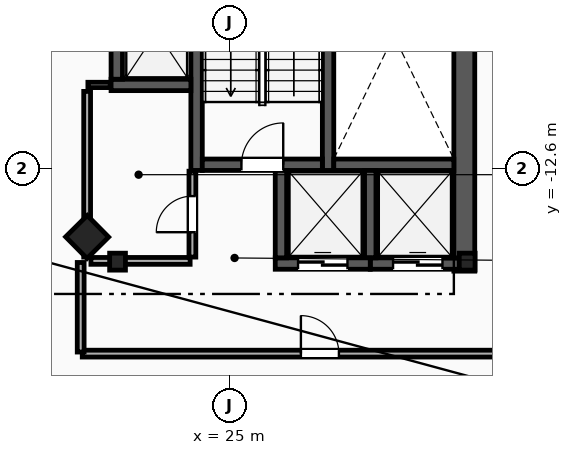
"""IFC4 building model, lengths in metres.
Left out: names, types, materials, properties, quantities, classifications, styles, units other than length and angle.
Written with IfcOpenShell. Run it as: python <this file> out.ifc"""

import sys

from ifc_helpers import new_model, si_unit, direction, frame, frame_2d, origin, origin_2d, place, context, subcontext, project, spatial, rectangle, i_section, extrude, element, fill, save


model = new_model("IFC4")
c1 = context("Model", 3, precision=1e-05, world=origin(), true_north=direction((0.0, 1.0)))
c2 = subcontext(c1, "Body", "Model", "MODEL_VIEW")
j1 = project(units=[si_unit("LENGTHUNIT", "METRE"), si_unit("PLANEANGLEUNIT", "RADIAN")], contexts=[c1])
p1 = place(None, origin())
s1 = spatial("IfcSite", under=j1, at=p1, CompositionType="ELEMENT")
p2 = place(p1, origin())
s2 = spatial("IfcBuilding", under=s1, at=p2, CompositionType="ELEMENT")
p3 = place(p2, frame((0.0, 0.0, 246.8)))
s3 = spatial("IfcBuildingStorey", under=s2, at=p3, CompositionType="ELEMENT", Elevation=246.8)
for number, where, z_axis, x_axis in (
    (1, (22.05, -15.05, 0.0), (0.0, 0.0, 1.0), (1.0, 0.0, 0.0)),
    (2, (31.25, -15.05, 0.0), (0.0, 0.0, 1.0), (1.0, 0.0, 0.0)),
):
    element("IfcColumn", number, at=place(p3, frame(where, z_axis=z_axis, x_axis=x_axis)), inside=s3, PredefinedType="COLUMN", context=c2, shape_type="SweptSolid", body=[
        extrude(i_section(OverallWidth=0.416, OverallDepth=0.446, WebThickness=0.039, FlangeThickness=0.063, FilletRadius=0.018, at=origin_2d()), origin(), (0.0, 0.0, 1.0), 3.6),
    ])
p4 = place(p3, frame((21.25, -14.4, 0.0), z_axis=(0.0, 0.0, 1.0), x_axis=(0.703270634186, -0.710922228581, 0.0)))
e3 = element("IfcColumn", 3, at=p4, inside=s3, PredefinedType="COLUMN", context=c2, shape_type="SweptSolid", body=[
    extrude(rectangle(XDim=0.8, YDim=0.8, at=origin_2d()), origin(), (0.0, 0.0, 1.0), 3.6),
])
p5 = place(p3, frame((31.175, -15.3, 0.0), z_axis=(0.0, 0.0, 1.0), x_axis=(0.0, 1.0, 0.0)))
e4 = element("IfcWall", 4, at=p5, inside=s3, PredefinedType="SHEAR", context=c2, shape_type="SweptSolid", body=[
    extrude(rectangle(XDim=13.33, YDim=0.55, at=frame_2d((6.665, 0.0))), origin(), (0.0, 0.0, 1.0), 3.34),
])
for number, where, z_axis, x_axis in (
    (5, (27.59, -12.65, 0.0), (0.0, 0.0, 1.0), (0.0, 1.0, 0.0)),
    (6, (24.13, -12.65, 0.0), (0.0, 0.0, 1.0), (0.0, 1.0, 0.0)),
):
    element("IfcWall", number, at=place(p3, frame(where, z_axis=z_axis, x_axis=x_axis)), inside=s3, PredefinedType="SHEAR", context=c2, shape_type="SweptSolid", body=[
        extrude(rectangle(XDim=10.68, YDim=0.3, at=frame_2d((5.34, 0.0))), origin(), (0.0, 0.0, 1.0), 3.34),
    ])
p6 = place(p3, frame((27.74, -12.5, 0.0), z_axis=(0.0, 0.0, 1.0), x_axis=(1.0, 0.0, 0.0)))
e7 = element("IfcWall", 7, at=p6, inside=s3, PredefinedType="SHEAR", context=c2, shape_type="SweptSolid", body=[
    extrude(rectangle(XDim=3.16, YDim=0.3, at=frame_2d((1.58, 0.0))), origin(), (0.0, 0.0, 1.0), 3.34),
])
p7 = place(p3, frame((24.28, -12.5, 0.0), z_axis=(0.0, 0.0, 1.0), x_axis=(1.0, 0.0, 0.0)))
e8 = element("IfcWall", 8, at=p7, inside=s3, PredefinedType="SHEAR", context=c2, shape_type="SweptSolid", body=[
    extrude(rectangle(XDim=3.16, YDim=0.3, at=frame_2d((1.58, 0.0))), origin(), (0.0, 0.0, 1.0), 3.34),
])
p8 = place(p7, frame((1.03, 0.0, 0.0)))
e9 = element("IfcOpeningElement", 9, at=p8, cuts=e8, PredefinedType="OPENING", context=c2, shape_type="SweptSolid", body=[
    extrude(rectangle(XDim=1.1, YDim=2.15, at=frame_2d((0.55, 1.075))), frame((0.0, 0.16, 0.0), z_axis=(0.0, -1.0, 0.0), x_axis=(1.0, 0.0, 0.0)), (0.0, 0.0, 1.0), 0.32),
])
p9 = place(p3, frame((21.88, -10.4, 0.0), z_axis=(0.0, 0.0, 1.0), x_axis=(1.0, 0.0, 0.0)))
e10 = element("IfcWall", 10, at=p9, inside=s3, PredefinedType="SHEAR", context=c2, shape_type="SweptSolid", body=[
    extrude(rectangle(XDim=2.1, YDim=0.3, at=frame_2d((1.05, 0.0))), origin(), (0.0, 0.0, 1.0), 3.34),
])
p10 = place(p3, frame((22.03, -10.25, 0.0), z_axis=(0.0, 0.0, 1.0), x_axis=(0.0, 1.0, 0.0)))
e11 = element("IfcWall", 11, at=p10, inside=s3, PredefinedType="SHEAR", context=c2, shape_type="SweptSolid", body=[
    extrude(rectangle(XDim=2.5, YDim=0.3, at=frame_2d((1.25, 0.0))), origin(), (0.0, 0.0, 1.0), 3.34),
])
p11 = place(p3, frame((28.7, -15.1, 0.0), z_axis=(0.0, 0.0, 1.0), x_axis=(1.0, 0.0, 0.0)))
e12 = element("IfcWall", 12, at=p11, inside=s3, PredefinedType="SHEAR", context=c2, shape_type="SweptSolid", body=[
    extrude(rectangle(XDim=2.5, YDim=0.3, at=frame_2d((1.25, 0.0))), origin(), (0.0, 0.0, 1.0), 3.34),
])
p12 = place(p11, frame((0.6, 0.0, 0.0)))
e13 = element("IfcOpeningElement", 13, at=p12, cuts=e12, PredefinedType="OPENING", context=c2, shape_type="SweptSolid", body=[
    extrude(rectangle(XDim=1.3, YDim=2.2, at=frame_2d((0.65, 1.1))), frame((0.0, 0.16, 0.0), z_axis=(0.0, -1.0, 0.0), x_axis=(1.0, 0.0, 0.0)), (0.0, 0.0, 1.0), 0.32),
])
p13 = place(p3, frame((28.7, -14.95, 0.0), z_axis=(0.0, 0.0, 1.0), x_axis=(0.0, 1.0, 0.0)))
e14 = element("IfcWall", 14, at=p13, inside=s3, PredefinedType="SHEAR", context=c2, shape_type="SweptSolid", body=[
    extrude(rectangle(XDim=2.3, YDim=0.3, at=frame_2d((1.15, 0.0))), origin(), (0.0, 0.0, 1.0), 3.34),
])
p14 = place(p3, frame((26.2, -15.1, 0.0), z_axis=(0.0, 0.0, 1.0), x_axis=(1.0, 0.0, 0.0)))
e15 = element("IfcWall", 15, at=p14, inside=s3, PredefinedType="SHEAR", context=c2, shape_type="SweptSolid", body=[
    extrude(rectangle(XDim=2.5, YDim=0.3, at=frame_2d((1.25, 0.0))), origin(), (0.0, 0.0, 1.0), 3.34),
])
p15 = place(p14, frame((0.6, 0.0, 0.0)))
e16 = element("IfcOpeningElement", 16, at=p15, cuts=e15, PredefinedType="OPENING", context=c2, shape_type="SweptSolid", body=[
    extrude(rectangle(XDim=1.3, YDim=2.2, at=frame_2d((0.65, 1.1))), frame((0.0, 0.16, 0.0), z_axis=(0.0, -1.0, 0.0), x_axis=(1.0, 0.0, 0.0)), (0.0, 0.0, 1.0), 0.32),
])
p16 = place(p3, frame((26.35, -14.95, 0.0), z_axis=(0.0, 0.0, 1.0), x_axis=(0.0, 1.0, 0.0)))
e17 = element("IfcWall", 17, at=p16, inside=s3, PredefinedType="SHEAR", context=c2, shape_type="SweptSolid", body=[
    extrude(rectangle(XDim=2.3, YDim=0.3, at=frame_2d((1.15, 0.0))), origin(), (0.0, 0.0, 1.0), 3.34),
])
p17 = place(p3, frame((21.27, -10.4, 0.0), z_axis=(0.0, 0.0, 1.0), x_axis=(1.0, 0.0, 0.0)))
e18 = element("IfcWall", 18, at=p17, inside=s3, PredefinedType="PARTITIONING", context=c2, shape_type="SweptSolid", body=[
    extrude(rectangle(XDim=0.59, YDim=0.14, at=frame_2d((0.295, 0.0))), origin(), (0.0, 0.0, 1.0), 3.34),
])
p18 = place(p3, frame((21.25, -14.93, 0.0), z_axis=(0.0, 0.0, 1.0), x_axis=(0.0, 1.0, 0.0)))
e19 = element("IfcWall", 19, at=p18, inside=s3, PredefinedType="PARTITIONING", context=c2, shape_type="SweptSolid", body=[
    extrude(rectangle(XDim=4.36, YDim=0.18, at=frame_2d((2.18, 0.0))), origin(), (0.0, 0.0, 1.0), 3.34),
])
p19 = place(p3, frame((21.35, -15.03, 0.0), z_axis=(0.0, 0.0, 1.0), x_axis=(1.0, 0.0, 0.0)))
e20 = element("IfcWall", 20, at=p19, inside=s3, PredefinedType="PARTITIONING", context=c2, shape_type="SweptSolid", body=[
    extrude(rectangle(XDim=2.61, YDim=0.18, at=frame_2d((1.305, 0.0))), origin(), (0.0, 0.0, 1.0), 2.413),
])
p20 = place(p3, frame((24.02, -14.93, 0.0), z_axis=(0.0, 0.0, 1.0), x_axis=(0.0, 1.0, 0.0)))
e21 = element("IfcWall", 21, at=p20, inside=s3, PredefinedType="PARTITIONING", context=c2, shape_type="SweptSolid", body=[
    extrude(rectangle(XDim=2.26, YDim=0.18, at=frame_2d((1.13, 0.0))), origin(), (0.0, 0.0, 1.0), 3.34),
])
p21 = place(p20, frame((0.655, 0.0, 0.0)))
e22 = element("IfcOpeningElement", 22, at=p21, cuts=e21, PredefinedType="OPENING", context=c2, shape_type="SweptSolid", body=[
    extrude(rectangle(XDim=0.95, YDim=2.1, at=frame_2d((0.475, 1.05))), frame((0.0, 0.1, 0.0), z_axis=(0.0, -1.0, 0.0), x_axis=(1.0, 0.0, 0.0)), (0.0, 0.0, 1.0), 0.2),
])
p22 = place(p3, frame((21.122, -17.47, 0.0), z_axis=(0.0, 0.0, 1.0), x_axis=(1.0, 0.0, 0.0)))
e23 = element("IfcWall", 23, at=p22, inside=s3, PredefinedType="PARTITIONING", context=c2, shape_type="SweptSolid", body=[
    extrude(rectangle(XDim=12.507, YDim=0.18, at=frame_2d((6.253, 0.0))), origin(), (0.0, 0.0, 1.0), 3.34),
])
p23 = place(p22, frame((5.753, 0.0, 0.0)))
e24 = element("IfcOpeningElement", 24, at=p23, cuts=e23, PredefinedType="OPENING", context=c2, shape_type="SweptSolid", body=[
    extrude(rectangle(XDim=1.0, YDim=2.15, at=frame_2d((0.5, 1.075))), frame((0.0, 0.1, 0.0), z_axis=(0.0, -1.0, 0.0), x_axis=(1.0, 0.0, 0.0)), (0.0, 0.0, 1.0), 0.2),
])
p24 = place(p3, frame((21.08, -15.072, 0.0), z_axis=(0.0, 0.0, 1.0), x_axis=(0.0, -1.0, 0.0)))
e25 = element("IfcWall", 25, at=p24, inside=s3, PredefinedType="PARTITIONING", context=c2, shape_type="SweptSolid", body=[
    extrude(rectangle(XDim=2.357, YDim=0.18, at=frame_2d((1.178, 0.0))), origin(), (0.0, 0.0, 1.0), 3.34),
])
p25 = place(p8, origin())
e26 = element("IfcDoor", 26, at=p25, inside=s3, OperationType="SINGLE_SWING_RIGHT", PredefinedType="DOOR", context=c2, shape_type="SweptSolid", body=[
    extrude(rectangle(XDim=1.1, YDim=2.15, at=frame_2d((0.55, 1.075))), frame((0.0, 0.025, 0.0), z_axis=(0.0, -1.0, 0.0), x_axis=(1.0, 0.0, 0.0)), (0.0, 0.0, 1.0), 0.05),
])
fill(e9, e26)
p26 = place(p12, origin())
e27 = element("IfcDoor", 27, at=p26, inside=s3, OperationType="SLIDING_TO_LEFT", PredefinedType="TRAPDOOR", context=c2, shape_type="SweptSolid", body=[
    extrude(rectangle(XDim=1.3, YDim=2.2, at=frame_2d((0.65, 1.1))), frame((0.0, 0.025, 0.0), z_axis=(0.0, -1.0, 0.0), x_axis=(1.0, 0.0, 0.0)), (0.0, 0.0, 1.0), 0.05),
])
fill(e13, e27)
p27 = place(p15, origin())
e28 = element("IfcDoor", 28, at=p27, inside=s3, OperationType="SLIDING_TO_LEFT", PredefinedType="TRAPDOOR", context=c2, shape_type="SweptSolid", body=[
    extrude(rectangle(XDim=1.3, YDim=2.2, at=frame_2d((0.65, 1.1))), frame((0.0, 0.025, 0.0), z_axis=(0.0, -1.0, 0.0), x_axis=(1.0, 0.0, 0.0)), (0.0, 0.0, 1.0), 0.05),
])
fill(e16, e28)
p28 = place(p23, origin())
e29 = element("IfcDoor", 29, at=p28, inside=s3, OperationType="SINGLE_SWING_LEFT", PredefinedType="DOOR", context=c2, shape_type="SweptSolid", body=[
    extrude(rectangle(XDim=1.0, YDim=2.15, at=frame_2d((0.5, 1.075))), frame((0.0, 0.025, 0.0), z_axis=(0.0, -1.0, 0.0), x_axis=(1.0, 0.0, 0.0)), (0.0, 0.0, 1.0), 0.05),
])
fill(e24, e29)
p29 = place(p21, origin())
e30 = element("IfcDoor", 30, at=p29, inside=s3, OperationType="SINGLE_SWING_LEFT", PredefinedType="DOOR", context=c2, shape_type="SweptSolid", body=[
    extrude(rectangle(XDim=0.95, YDim=2.1, at=frame_2d((0.475, 1.05))), frame((0.0, 0.025, 0.0), z_axis=(0.0, -1.0, 0.0), x_axis=(1.0, 0.0, 0.0)), (0.0, 0.0, 1.0), 0.05),
])
fill(e22, e30)
save(model, sys.argv[1])
